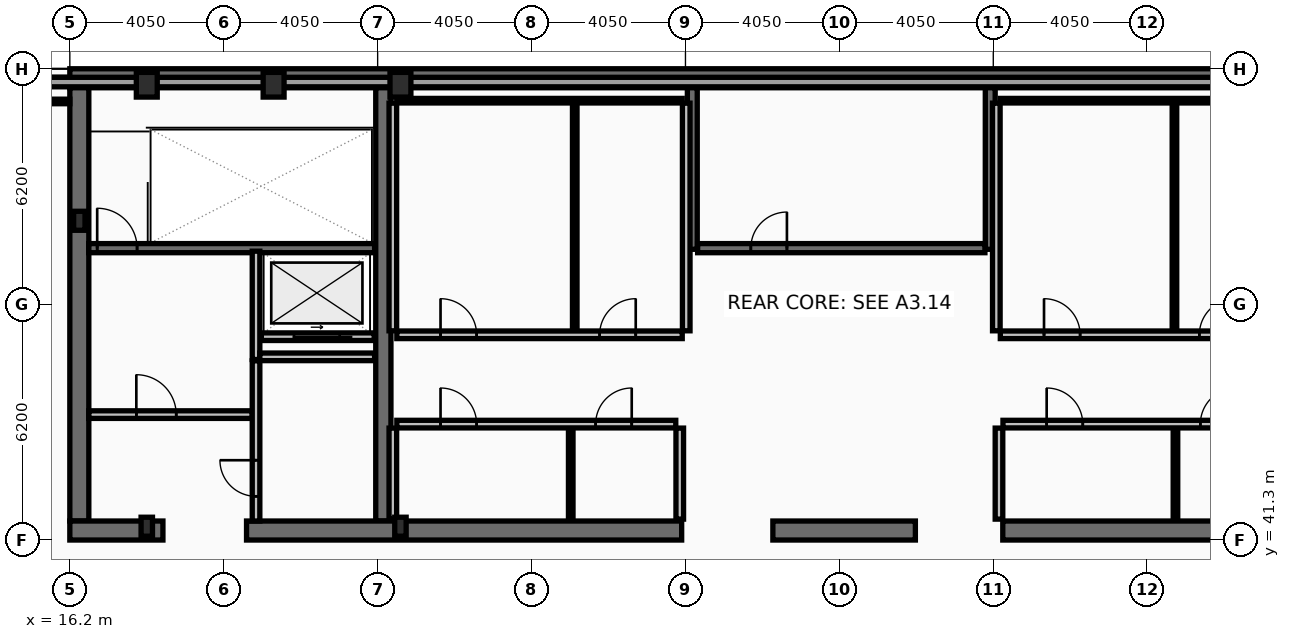
"""IFC4 building model, lengths in metres.
Left out: names, types, materials, properties, quantities, classifications, styles, units other than length and angle.
Written with IfcOpenShell. Run it as: python <this file> out.ifc"""

import sys

from ifc_helpers import new_model, si_unit, direction, frame, frame_2d, origin, origin_2d, place, context, subcontext, project, spatial, rectangle, hollow_rectangle, i_section, extrude, element, fill, save


model = new_model("IFC4")
c1 = context("Model", 3, precision=1e-05, world=origin(), true_north=direction((0.0, 1.0)))
c2 = subcontext(c1, "Body", "Model", "MODEL_VIEW")
j1 = project(units=[si_unit("LENGTHUNIT", "METRE"), si_unit("PLANEANGLEUNIT", "RADIAN")], contexts=[c1])
p1 = place(None, origin())
s1 = spatial("IfcSite", under=j1, at=p1, CompositionType="ELEMENT")
p2 = place(p1, origin())
s2 = spatial("IfcBuilding", under=s1, at=p2, CompositionType="ELEMENT")
p3 = place(p2, frame((0.0, 0.0, 378.6)))
s3 = spatial("IfcBuildingStorey", under=s2, at=p3, CompositionType="ELEMENT", Elevation=378.6)
p4 = place(p3, frame((16.2, 53.45, 0.0), z_axis=(0.0, 0.0, 1.0), x_axis=(1.0, 0.0, 0.0)))
e1 = element("IfcWall", 1, at=p4, inside=s3, PredefinedType="SHEAR", context=c2, shape_type="SweptSolid", body=[
    extrude(rectangle(XDim=40.5, YDim=0.5, at=frame_2d((20.25, 0.0))), origin(), (0.0, 0.0, 1.0), 4.0),
])
p5 = place(p3, frame((16.45, 41.8, 0.0), z_axis=(0.0, 0.0, 1.0), x_axis=(0.0, 1.0, 0.0)))
e2 = element("IfcWall", 2, at=p5, inside=s3, PredefinedType="SHEAR", context=c2, shape_type="SweptSolid", body=[
    extrude(rectangle(XDim=11.4, YDim=0.5, at=frame_2d((5.7, 0.0))), origin(), (0.0, 0.0, 1.0), 4.0),
])
p6 = place(p3, frame((24.45, 41.8, 0.0), z_axis=(0.0, 0.0, 1.0), x_axis=(0.0, 1.0, 0.0)))
e3 = element("IfcWall", 3, at=p6, inside=s3, PredefinedType="SHEAR", context=c2, shape_type="SweptSolid", body=[
    extrude(rectangle(XDim=11.4, YDim=0.4, at=frame_2d((5.7, 0.0))), origin(), (0.0, 0.0, 1.0), 4.0),
])
p7 = place(p3, frame((18.65, 41.55, 0.0), z_axis=(0.0, 0.0, 1.0), x_axis=(-1.0, 0.0, 0.0)))
e4 = element("IfcWall", 4, at=p7, inside=s3, PredefinedType="SHEAR", context=c2, shape_type="SweptSolid", body=[
    extrude(rectangle(XDim=2.45, YDim=0.5, at=frame_2d((1.225, 0.0))), origin(), (0.0, 0.0, 1.0), 4.0),
])
p8 = place(p3, frame((32.3, 41.55, 0.0), z_axis=(0.0, 0.0, 1.0), x_axis=(-1.0, 0.0, 0.0)))
e5 = element("IfcWall", 5, at=p8, inside=s3, PredefinedType="SHEAR", context=c2, shape_type="SweptSolid", body=[
    extrude(rectangle(XDim=11.45, YDim=0.5, at=frame_2d((5.725, 0.0))), origin(), (0.0, 0.0, 1.0), 4.0),
])
p9 = place(p3, frame((38.45, 41.55, 0.0), z_axis=(0.0, 0.0, 1.0), x_axis=(-1.0, 0.0, 0.0)))
e6 = element("IfcWall", 6, at=p9, inside=s3, PredefinedType="SHEAR", context=c2, shape_type="SweptSolid", body=[
    extrude(rectangle(XDim=3.75, YDim=0.5, at=frame_2d((1.875, 0.0))), origin(), (0.0, 0.0, 1.0), 4.0),
])
p10 = place(p3, frame((52.05, 41.55, 0.0), z_axis=(0.0, 0.0, 1.0), x_axis=(-1.0, 0.0, 0.0)))
e7 = element("IfcWall", 7, at=p10, inside=s3, PredefinedType="SHEAR", context=c2, shape_type="SweptSolid", body=[
    extrude(rectangle(XDim=11.3, YDim=0.5, at=frame_2d((5.65, 0.0))), origin(), (0.0, 0.0, 1.0), 4.0),
])
for number, where, z_axis, x_axis in (
    (8, (32.58, 48.95, 0.0), (0.0, 0.0, 1.0), (0.0, 1.0, 0.0)),
    (9, (40.42, 48.95, 0.0), (0.0, 0.0, 1.0), (0.0, 1.0, 0.0)),
):
    element("IfcWall", number, at=place(p3, frame(where, z_axis=z_axis, x_axis=x_axis)), inside=s3, PredefinedType="SHEAR", context=c2, shape_type="SweptSolid", body=[
        extrude(rectangle(XDim=4.25, YDim=0.26, at=frame_2d((2.125, 0.0))), origin(), (0.0, 0.0, 1.0), 4.0),
    ])
p11 = place(p3, frame((16.7, 48.98, 0.0), z_axis=(0.0, 0.0, 1.0), x_axis=(1.0, 0.0, 0.0)))
e10 = element("IfcWall", 10, at=p11, inside=s3, PredefinedType="SHEAR", context=c2, shape_type="SweptSolid", body=[
    extrude(rectangle(XDim=7.52, YDim=0.24, at=frame_2d((3.76, 0.0))), origin(), (0.0, 0.0, 1.0), 4.0),
])
p12 = place(p11, frame((0.22, 0.0, 0.0)))
e11 = element("IfcOpeningElement", 11, at=p12, cuts=e10, PredefinedType="OPENING", context=c2, shape_type="SweptSolid", body=[
    extrude(rectangle(XDim=1.05, YDim=2.15, at=frame_2d((0.525, 1.075))), frame((0.0, 0.13, 0.0), z_axis=(0.0, -1.0, 0.0), x_axis=(1.0, 0.0, 0.0)), (0.0, 0.0, 1.0), 0.26),
])
p13 = place(p3, frame((32.72, 48.98, 0.0), z_axis=(0.0, 0.0, 1.0), x_axis=(1.0, 0.0, 0.0)))
e12 = element("IfcWall", 12, at=p13, inside=s3, PredefinedType="SHEAR", context=c2, shape_type="SweptSolid", body=[
    extrude(rectangle(XDim=7.56, YDim=0.24, at=frame_2d((3.78, 0.0))), origin(), (0.0, 0.0, 1.0), 4.0),
])
p14 = place(p13, frame((1.4, 0.0, 0.0)))
e13 = element("IfcOpeningElement", 13, at=p14, cuts=e12, PredefinedType="OPENING", context=c2, shape_type="SweptSolid", body=[
    extrude(rectangle(XDim=0.95, YDim=2.1, at=frame_2d((0.475, 1.05))), frame((0.0, 0.13, 0.0), z_axis=(0.0, -1.0, 0.0), x_axis=(1.0, 0.0, 0.0)), (0.0, 0.0, 1.0), 0.26),
])
for number, where, z_axis, x_axis in (
    (14, (18.225, 53.28, 0.0), (0.0, 0.0, 1.0), (1.0, 0.0, 0.0)),
    (15, (21.562, 53.28, 0.0), (0.0, 0.0, 1.0), (1.0, 0.0, 0.0)),
    (16, (24.9, 53.28, 0.0), (0.0, 0.0, 1.0), (1.0, 0.0, 0.0)),
):
    element("IfcColumn", number, at=place(p3, frame(where, z_axis=z_axis, x_axis=x_axis)), inside=s3, PredefinedType="COLUMN", context=c2, shape_type="SweptSolid", body=[
        extrude(hollow_rectangle(XDim=0.55, YDim=0.65, WallThickness=0.04, at=origin_2d()), origin(), (0.0, 0.0, 1.0), 5.36),
    ])
p15 = place(p3, frame((16.45, 49.7, 0.0), z_axis=(0.0, 0.0, 1.0), x_axis=(1.0, 0.0, 0.0)))
e17 = element("IfcColumn", 17, at=p15, inside=s3, PredefinedType="COLUMN", context=c2, shape_type="SweptSolid", body=[
    extrude(i_section(OverallWidth=0.3, OverallDepth=0.5, WebThickness=0.014, FlangeThickness=0.028, at=origin_2d()), origin(), (0.0, 0.0, 1.0), 5.36),
])
p16 = place(p3, frame((18.225, 41.65, 0.0), z_axis=(0.0, 0.0, 1.0), x_axis=(1.0, 0.0, 0.0)))
e18 = element("IfcColumn", 18, at=p16, inside=s3, PredefinedType="COLUMN", context=c2, shape_type="SweptSolid", body=[
    extrude(i_section(OverallWidth=0.3, OverallDepth=0.5, WebThickness=0.014, FlangeThickness=0.028, at=origin_2d()), origin(), (0.0, 0.0, 1.0), 4.1),
])
p17 = place(p3, frame((24.9, 41.65, 0.0), z_axis=(0.0, 0.0, 1.0), x_axis=(1.0, 0.0, 0.0)))
e19 = element("IfcColumn", 19, at=p17, inside=s3, PredefinedType="COLUMN", context=c2, shape_type="SweptSolid", body=[
    extrude(i_section(OverallWidth=0.3, OverallDepth=0.5, WebThickness=0.014, FlangeThickness=0.028, at=origin_2d()), origin(), (0.0, 0.0, 1.0), 5.36),
])
p18 = place(p3, frame((57.7, 53.35, 5.58), z_axis=(0.0, 0.0, 1.0), x_axis=(-1.0, 0.0, 0.0)))
e20 = element("IfcWall", 20, at=p18, inside=s3, PredefinedType="PARAPET", context=c2, shape_type="SweptSolid", body=[
    extrude(rectangle(XDim=42.5, YDim=0.25, at=frame_2d((21.25, 0.0))), origin(), (0.0, 0.0, 1.0), 0.9),
])
p19 = place(p3, frame((24.21, 46.65, 0.0), z_axis=(0.0, 0.0, 1.0), x_axis=(-1.0, 0.0, 0.0)))
e21 = element("IfcWall", 21, at=p19, inside=s3, PredefinedType="PARTITIONING", context=c2, shape_type="SweptSolid", body=[
    extrude(rectangle(XDim=2.97, YDim=0.2, at=frame_2d((1.485, 0.0))), origin(), (0.0, 0.0, 1.0), 4.18),
])
p20 = place(p19, frame((0.91, 0.0, 0.0)))
e22 = element("IfcOpeningElement", 22, at=p20, cuts=e21, PredefinedType="OPENING", context=c2, shape_type="SweptSolid", body=[
    extrude(rectangle(XDim=1.2, YDim=2.18, at=frame_2d((0.6, 1.09))), frame((0.0, 0.11, 0.0), z_axis=(0.0, -1.0, 0.0), x_axis=(1.0, 0.0, 0.0)), (0.0, 0.0, 1.0), 0.22),
])
p21 = place(p3, frame((21.1, 46.05, 0.0), z_axis=(0.0, 0.0, 1.0), x_axis=(0.0, 1.0, 0.0)))
e23 = element("IfcWall", 23, at=p21, inside=s3, PredefinedType="PARTITIONING", context=c2, shape_type="SweptSolid", body=[
    extrude(rectangle(XDim=2.85, YDim=0.2, at=frame_2d((1.425, 0.0))), origin(), (0.0, 0.0, 1.0), 4.18),
])
p22 = place(p3, frame((16.7, 44.6, 0.0), z_axis=(0.0, 0.0, 1.0), x_axis=(1.0, 0.0, 0.0)))
e24 = element("IfcWall", 24, at=p22, inside=s3, PredefinedType="PARTITIONING", context=c2, shape_type="SweptSolid", body=[
    extrude(rectangle(XDim=4.3, YDim=0.2, at=frame_2d((2.15, 0.0))), origin(), (0.0, 0.0, 1.0), 4.18),
])
p23 = place(p22, frame((1.25, 0.0, 0.0)))
e25 = element("IfcOpeningElement", 25, at=p23, cuts=e24, PredefinedType="OPENING", context=c2, shape_type="SweptSolid", body=[
    extrude(rectangle(XDim=1.05, YDim=2.15, at=frame_2d((0.525, 1.075))), frame((0.0, 0.11, 0.0), z_axis=(0.0, -1.0, 0.0), x_axis=(1.0, 0.0, 0.0)), (0.0, 0.0, 1.0), 0.22),
])
p24 = place(p3, frame((21.2, 46.12, 0.0), z_axis=(0.0, 0.0, 1.0), x_axis=(1.0, 0.0, 0.0)))
e26 = element("IfcWall", 26, at=p24, inside=s3, PredefinedType="PARTITIONING", context=c2, shape_type="SweptSolid", body=[
    extrude(rectangle(XDim=3.02, YDim=0.2, at=frame_2d((1.51, 0.0))), origin(), (0.0, 0.0, 1.0), 4.18),
])
p25 = place(p3, frame((21.1, 41.8, 0.0), z_axis=(0.0, 0.0, 1.0), x_axis=(0.0, 1.0, 0.0)))
e27 = element("IfcWall", 27, at=p25, inside=s3, PredefinedType="PARTITIONING", context=c2, shape_type="SweptSolid", body=[
    extrude(rectangle(XDim=4.215, YDim=0.2, at=frame_2d((2.107, 0.0))), origin(), (0.0, 0.0, 1.0), 4.18),
])
p26 = place(p25, frame((0.65, 0.0, 0.0)))
e28 = element("IfcOpeningElement", 28, at=p26, cuts=e27, PredefinedType="OPENING", context=c2, shape_type="SweptSolid", body=[
    extrude(rectangle(XDim=0.95, YDim=2.1, at=frame_2d((0.475, 1.05))), frame((0.0, 0.11, 0.0), z_axis=(0.0, -1.0, 0.0), x_axis=(1.0, 0.0, 0.0)), (0.0, 0.0, 1.0), 0.22),
])
for number, where, z_axis, x_axis in (
    (29, (24.7, 46.805, 0.0), (0.0, 0.0, 1.0), (0.0, 1.0, 0.0)),
    (30, (32.42, 46.805, 0.0), (0.0, 0.0, 1.0), (0.0, 1.0, 0.0)),
):
    element("IfcWall", number, at=place(p3, frame(where, z_axis=z_axis, x_axis=x_axis)), inside=s3, PredefinedType="PARTITIONING", context=c2, shape_type="SweptSolid", body=[
        extrude(rectangle(XDim=5.99, YDim=0.2, at=frame_2d((2.995, 0.0))), origin(), (0.0, 0.0, 1.0), 4.18),
    ])
p27 = place(p3, frame((24.805, 52.86, 0.0), z_axis=(0.0, 0.0, 1.0), x_axis=(1.0, 0.0, 0.0)))
e31 = element("IfcWall", 31, at=p27, inside=s3, PredefinedType="PARTITIONING", context=c2, shape_type="SweptSolid", body=[
    extrude(rectangle(XDim=7.51, YDim=0.12, at=frame_2d((3.755, 0.0))), origin(), (0.0, 0.0, 1.0), 4.18),
])
p28 = place(p3, frame((29.486, 46.805, 0.0), z_axis=(0.0, 0.0, 1.0), x_axis=(0.0, 1.0, 0.0)))
e32 = element("IfcWall", 32, at=p28, inside=s3, PredefinedType="PARTITIONING", context=c2, shape_type="SweptSolid", body=[
    extrude(rectangle(XDim=5.99, YDim=0.12, at=frame_2d((2.995, 0.0))), origin(), (0.0, 0.0, 1.0), 4.18),
])
p29 = place(p3, frame((24.805, 46.7, 0.0), z_axis=(0.0, 0.0, 1.0), x_axis=(1.0, 0.0, 0.0)))
e33 = element("IfcWall", 33, at=p29, inside=s3, PredefinedType="PARTITIONING", context=c2, shape_type="SweptSolid", body=[
    extrude(rectangle(XDim=7.51, YDim=0.2, at=frame_2d((3.755, 0.0))), origin(), (0.0, 0.0, 1.0), 4.18),
])
p30 = place(p29, frame((1.15, 0.0, 0.0)))
e34 = element("IfcOpeningElement", 34, at=p30, cuts=e33, PredefinedType="OPENING", context=c2, shape_type="SweptSolid", body=[
    extrude(rectangle(XDim=0.95, YDim=2.1, at=frame_2d((0.475, 1.05))), frame((0.0, 0.11, 0.0), z_axis=(0.0, -1.0, 0.0), x_axis=(1.0, 0.0, 0.0)), (0.0, 0.0, 1.0), 0.22),
])
p31 = place(p29, frame((5.336, 0.0, 0.0)))
e35 = element("IfcOpeningElement", 35, at=p31, cuts=e33, PredefinedType="OPENING", context=c2, shape_type="SweptSolid", body=[
    extrude(rectangle(XDim=0.95, YDim=2.1, at=frame_2d((0.475, 1.05))), frame((0.0, 0.11, 0.0), z_axis=(0.0, -1.0, 0.0), x_axis=(1.0, 0.0, 0.0)), (0.0, 0.0, 1.0), 0.22),
])
for number, where, z_axis, x_axis in (
    (36, (24.7, 41.85, 0.0), (0.0, 0.0, 1.0), (0.0, 1.0, 0.0)),
    (37, (32.25, 41.85, 0.0), (0.0, 0.0, 1.0), (0.0, 1.0, 0.0)),
):
    element("IfcWall", number, at=place(p3, frame(where, z_axis=z_axis, x_axis=x_axis)), inside=s3, PredefinedType="PARTITIONING", context=c2, shape_type="SweptSolid", body=[
        extrude(rectangle(XDim=2.395, YDim=0.2, at=frame_2d((1.198, 0.0))), origin(), (0.0, 0.0, 1.0), 4.18),
    ])
p32 = place(p3, frame((29.381, 41.85, 0.0), z_axis=(0.0, 0.0, 1.0), x_axis=(0.0, 1.0, 0.0)))
e38 = element("IfcWall", 38, at=p32, inside=s3, PredefinedType="PARTITIONING", context=c2, shape_type="SweptSolid", body=[
    extrude(rectangle(XDim=2.395, YDim=0.12, at=frame_2d((1.198, 0.0))), origin(), (0.0, 0.0, 1.0), 4.18),
])
p33 = place(p3, frame((24.805, 44.35, 0.0), z_axis=(0.0, 0.0, 1.0), x_axis=(1.0, 0.0, 0.0)))
e39 = element("IfcWall", 39, at=p33, inside=s3, PredefinedType="PARTITIONING", context=c2, shape_type="SweptSolid", body=[
    extrude(rectangle(XDim=7.34, YDim=0.2, at=frame_2d((3.67, 0.0))), origin(), (0.0, 0.0, 1.0), 4.18),
])
p34 = place(p33, frame((1.15, 0.0, 0.0)))
e40 = element("IfcOpeningElement", 40, at=p34, cuts=e39, PredefinedType="OPENING", context=c2, shape_type="SweptSolid", body=[
    extrude(rectangle(XDim=0.95, YDim=2.1, at=frame_2d((0.475, 1.05))), frame((0.0, 0.11, 0.0), z_axis=(0.0, -1.0, 0.0), x_axis=(1.0, 0.0, 0.0)), (0.0, 0.0, 1.0), 0.22),
])
p35 = place(p33, frame((5.231, 0.0, 0.0)))
e41 = element("IfcOpeningElement", 41, at=p35, cuts=e39, PredefinedType="OPENING", context=c2, shape_type="SweptSolid", body=[
    extrude(rectangle(XDim=0.95, YDim=2.1, at=frame_2d((0.475, 1.05))), frame((0.0, 0.11, 0.0), z_axis=(0.0, -1.0, 0.0), x_axis=(1.0, 0.0, 0.0)), (0.0, 0.0, 1.0), 0.22),
])
p36 = place(p3, frame((40.58, 46.805, 0.0), z_axis=(0.0, 0.0, 1.0), x_axis=(0.0, 1.0, 0.0)))
e42 = element("IfcWall", 42, at=p36, inside=s3, PredefinedType="PARTITIONING", context=c2, shape_type="SweptSolid", body=[
    extrude(rectangle(XDim=5.99, YDim=0.2, at=frame_2d((2.995, 0.0))), origin(), (0.0, 0.0, 1.0), 4.18),
])
p37 = place(p3, frame((40.685, 52.86, 0.0), z_axis=(0.0, 0.0, 1.0), x_axis=(1.0, 0.0, 0.0)))
e43 = element("IfcWall", 43, at=p37, inside=s3, PredefinedType="PARTITIONING", context=c2, shape_type="SweptSolid", body=[
    extrude(rectangle(XDim=7.35, YDim=0.12, at=frame_2d((3.675, 0.0))), origin(), (0.0, 0.0, 1.0), 4.18),
])
p38 = place(p3, frame((45.267, 46.805, 0.0), z_axis=(0.0, 0.0, 1.0), x_axis=(0.0, 1.0, 0.0)))
e44 = element("IfcWall", 44, at=p38, inside=s3, PredefinedType="PARTITIONING", context=c2, shape_type="SweptSolid", body=[
    extrude(rectangle(XDim=5.99, YDim=0.12, at=frame_2d((2.995, 0.0))), origin(), (0.0, 0.0, 1.0), 4.18),
])
p39 = place(p3, frame((40.685, 46.7, 0.0), z_axis=(0.0, 0.0, 1.0), x_axis=(1.0, 0.0, 0.0)))
e45 = element("IfcWall", 45, at=p39, inside=s3, PredefinedType="PARTITIONING", context=c2, shape_type="SweptSolid", body=[
    extrude(rectangle(XDim=7.35, YDim=0.2, at=frame_2d((3.675, 0.0))), origin(), (0.0, 0.0, 1.0), 4.18),
])
p40 = place(p39, frame((1.15, 0.0, 0.0)))
e46 = element("IfcOpeningElement", 46, at=p40, cuts=e45, PredefinedType="OPENING", context=c2, shape_type="SweptSolid", body=[
    extrude(rectangle(XDim=0.95, YDim=2.1, at=frame_2d((0.475, 1.05))), frame((0.0, 0.11, 0.0), z_axis=(0.0, -1.0, 0.0), x_axis=(1.0, 0.0, 0.0)), (0.0, 0.0, 1.0), 0.22),
])
p41 = place(p39, frame((5.237, 0.0, 0.0)))
e47 = element("IfcOpeningElement", 47, at=p41, cuts=e45, PredefinedType="OPENING", context=c2, shape_type="SweptSolid", body=[
    extrude(rectangle(XDim=0.95, YDim=2.1, at=frame_2d((0.475, 1.05))), frame((0.0, 0.11, 0.0), z_axis=(0.0, -1.0, 0.0), x_axis=(1.0, 0.0, 0.0)), (0.0, 0.0, 1.0), 0.22),
])
p42 = place(p3, frame((40.65, 41.85, 0.0), z_axis=(0.0, 0.0, 1.0), x_axis=(0.0, 1.0, 0.0)))
e48 = element("IfcWall", 48, at=p42, inside=s3, PredefinedType="PARTITIONING", context=c2, shape_type="SweptSolid", body=[
    extrude(rectangle(XDim=2.395, YDim=0.2, at=frame_2d((1.198, 0.0))), origin(), (0.0, 0.0, 1.0), 4.18),
])
p43 = place(p3, frame((45.294, 41.85, 0.0), z_axis=(0.0, 0.0, 1.0), x_axis=(0.0, 1.0, 0.0)))
e49 = element("IfcWall", 49, at=p43, inside=s3, PredefinedType="PARTITIONING", context=c2, shape_type="SweptSolid", body=[
    extrude(rectangle(XDim=2.395, YDim=0.12, at=frame_2d((1.198, 0.0))), origin(), (0.0, 0.0, 1.0), 4.18),
])
p44 = place(p3, frame((40.755, 44.35, 0.0), z_axis=(0.0, 0.0, 1.0), x_axis=(1.0, 0.0, 0.0)))
e50 = element("IfcWall", 50, at=p44, inside=s3, PredefinedType="PARTITIONING", context=c2, shape_type="SweptSolid", body=[
    extrude(rectangle(XDim=7.28, YDim=0.2, at=frame_2d((3.64, 0.0))), origin(), (0.0, 0.0, 1.0), 4.18),
])
p45 = place(p44, frame((1.15, 0.0, 0.0)))
e51 = element("IfcOpeningElement", 51, at=p45, cuts=e50, PredefinedType="OPENING", context=c2, shape_type="SweptSolid", body=[
    extrude(rectangle(XDim=0.95, YDim=2.1, at=frame_2d((0.475, 1.05))), frame((0.0, 0.11, 0.0), z_axis=(0.0, -1.0, 0.0), x_axis=(1.0, 0.0, 0.0)), (0.0, 0.0, 1.0), 0.22),
])
p46 = place(p44, frame((5.194, 0.0, 0.0)))
e52 = element("IfcOpeningElement", 52, at=p46, cuts=e50, PredefinedType="OPENING", context=c2, shape_type="SweptSolid", body=[
    extrude(rectangle(XDim=0.95, YDim=2.1, at=frame_2d((0.475, 1.05))), frame((0.0, 0.11, 0.0), z_axis=(0.0, -1.0, 0.0), x_axis=(1.0, 0.0, 0.0)), (0.0, 0.0, 1.0), 0.22),
])
p47 = place(p3, frame((12.095, 52.84, 0.0), z_axis=(0.0, 0.0, 1.0), x_axis=(1.0, 0.0, 0.0)))
e53 = element("IfcWall", 53, at=p47, inside=s3, PredefinedType="PARTITIONING", context=c2, shape_type="SweptSolid", body=[
    extrude(rectangle(XDim=4.105, YDim=0.12, at=frame_2d((2.052, 0.0))), origin(), (0.0, 0.0, 1.0), 4.18),
])
p48 = place(p12, origin())
e54 = element("IfcDoor", 54, at=p48, inside=s3, OperationType="SINGLE_SWING_LEFT", PredefinedType="DOOR", context=c2, shape_type="SweptSolid", body=[
    extrude(rectangle(XDim=1.05, YDim=2.15, at=frame_2d((0.525, 1.075))), frame((0.0, 0.025, 0.0), z_axis=(0.0, -1.0, 0.0), x_axis=(1.0, 0.0, 0.0)), (0.0, 0.0, 1.0), 0.05),
])
fill(e11, e54)
p49 = place(p14, origin())
e55 = element("IfcDoor", 55, at=p49, inside=s3, OperationType="SINGLE_SWING_RIGHT", PredefinedType="DOOR", context=c2, shape_type="SweptSolid", body=[
    extrude(rectangle(XDim=0.95, YDim=2.1, at=frame_2d((0.475, 1.05))), frame((0.0, 0.025, 0.0), z_axis=(0.0, -1.0, 0.0), x_axis=(1.0, 0.0, 0.0)), (0.0, 0.0, 1.0), 0.05),
])
fill(e13, e55)
p50 = place(p20, origin())
e56 = element("IfcDoor", 56, at=p50, inside=s3, OperationType="SLIDING_TO_LEFT", PredefinedType="DOOR", context=c2, shape_type="SweptSolid", body=[
    extrude(rectangle(XDim=1.2, YDim=2.18, at=frame_2d((0.6, 1.09))), frame((0.0, 0.025, 0.0), z_axis=(0.0, -1.0, 0.0), x_axis=(1.0, 0.0, 0.0)), (0.0, 0.0, 1.0), 0.05),
])
fill(e22, e56)
p51 = place(p23, origin())
e57 = element("IfcDoor", 57, at=p51, inside=s3, OperationType="SINGLE_SWING_LEFT", PredefinedType="DOOR", context=c2, shape_type="SweptSolid", body=[
    extrude(rectangle(XDim=1.05, YDim=2.15, at=frame_2d((0.525, 1.075))), frame((0.0, 0.025, 0.0), z_axis=(0.0, -1.0, 0.0), x_axis=(1.0, 0.0, 0.0)), (0.0, 0.0, 1.0), 0.05),
])
fill(e25, e57)
p52 = place(p26, origin())
e58 = element("IfcDoor", 58, at=p52, inside=s3, OperationType="SINGLE_SWING_RIGHT", PredefinedType="DOOR", context=c2, shape_type="SweptSolid", body=[
    extrude(rectangle(XDim=0.95, YDim=2.1, at=frame_2d((0.475, 1.05))), frame((0.0, 0.025, 0.0), z_axis=(0.0, -1.0, 0.0), x_axis=(1.0, 0.0, 0.0)), (0.0, 0.0, 1.0), 0.05),
])
fill(e28, e58)
p53 = place(p30, origin())
e59 = element("IfcDoor", 59, at=p53, inside=s3, OperationType="SINGLE_SWING_LEFT", PredefinedType="DOOR", context=c2, shape_type="SweptSolid", body=[
    extrude(rectangle(XDim=0.95, YDim=2.1, at=frame_2d((0.475, 1.05))), frame((0.0, 0.025, 0.0), z_axis=(0.0, -1.0, 0.0), x_axis=(1.0, 0.0, 0.0)), (0.0, 0.0, 1.0), 0.05),
])
fill(e34, e59)
p54 = place(p31, origin())
e60 = element("IfcDoor", 60, at=p54, inside=s3, OperationType="SINGLE_SWING_RIGHT", PredefinedType="DOOR", context=c2, shape_type="SweptSolid", body=[
    extrude(rectangle(XDim=0.95, YDim=2.1, at=frame_2d((0.475, 1.05))), frame((0.0, 0.025, 0.0), z_axis=(0.0, -1.0, 0.0), x_axis=(1.0, 0.0, 0.0)), (0.0, 0.0, 1.0), 0.05),
])
fill(e35, e60)
p55 = place(p34, origin())
e61 = element("IfcDoor", 61, at=p55, inside=s3, OperationType="SINGLE_SWING_LEFT", PredefinedType="DOOR", context=c2, shape_type="SweptSolid", body=[
    extrude(rectangle(XDim=0.95, YDim=2.1, at=frame_2d((0.475, 1.05))), frame((0.0, 0.025, 0.0), z_axis=(0.0, -1.0, 0.0), x_axis=(1.0, 0.0, 0.0)), (0.0, 0.0, 1.0), 0.05),
])
fill(e40, e61)
p56 = place(p35, origin())
e62 = element("IfcDoor", 62, at=p56, inside=s3, OperationType="SINGLE_SWING_RIGHT", PredefinedType="DOOR", context=c2, shape_type="SweptSolid", body=[
    extrude(rectangle(XDim=0.95, YDim=2.1, at=frame_2d((0.475, 1.05))), frame((0.0, 0.025, 0.0), z_axis=(0.0, -1.0, 0.0), x_axis=(1.0, 0.0, 0.0)), (0.0, 0.0, 1.0), 0.05),
])
fill(e41, e62)
p57 = place(p40, origin())
e63 = element("IfcDoor", 63, at=p57, inside=s3, OperationType="SINGLE_SWING_LEFT", PredefinedType="DOOR", context=c2, shape_type="SweptSolid", body=[
    extrude(rectangle(XDim=0.95, YDim=2.1, at=frame_2d((0.475, 1.05))), frame((0.0, 0.025, 0.0), z_axis=(0.0, -1.0, 0.0), x_axis=(1.0, 0.0, 0.0)), (0.0, 0.0, 1.0), 0.05),
])
fill(e46, e63)
p58 = place(p41, origin())
e64 = element("IfcDoor", 64, at=p58, inside=s3, OperationType="SINGLE_SWING_RIGHT", PredefinedType="DOOR", context=c2, shape_type="SweptSolid", body=[
    extrude(rectangle(XDim=0.95, YDim=2.1, at=frame_2d((0.475, 1.05))), frame((0.0, 0.025, 0.0), z_axis=(0.0, -1.0, 0.0), x_axis=(1.0, 0.0, 0.0)), (0.0, 0.0, 1.0), 0.05),
])
fill(e47, e64)
p59 = place(p45, origin())
e65 = element("IfcDoor", 65, at=p59, inside=s3, OperationType="SINGLE_SWING_LEFT", PredefinedType="DOOR", context=c2, shape_type="SweptSolid", body=[
    extrude(rectangle(XDim=0.95, YDim=2.1, at=frame_2d((0.475, 1.05))), frame((0.0, 0.025, 0.0), z_axis=(0.0, -1.0, 0.0), x_axis=(1.0, 0.0, 0.0)), (0.0, 0.0, 1.0), 0.05),
])
fill(e51, e65)
p60 = place(p46, origin())
e66 = element("IfcDoor", 66, at=p60, inside=s3, OperationType="SINGLE_SWING_RIGHT", PredefinedType="DOOR", context=c2, shape_type="SweptSolid", body=[
    extrude(rectangle(XDim=0.95, YDim=2.1, at=frame_2d((0.475, 1.05))), frame((0.0, 0.025, 0.0), z_axis=(0.0, -1.0, 0.0), x_axis=(1.0, 0.0, 0.0)), (0.0, 0.0, 1.0), 0.05),
])
fill(e52, e66)
save(model, sys.argv[1])
